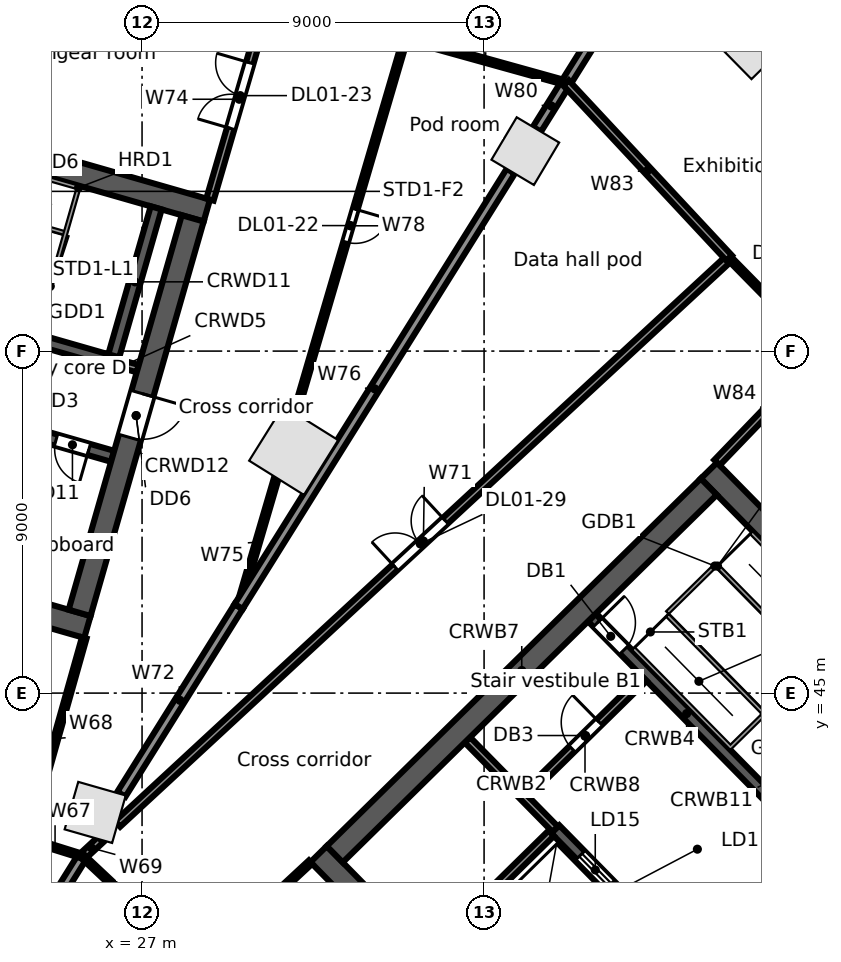
"""IFC4 building model, lengths in metres.
Left out: names, types, materials, properties, quantities, classifications, styles, units other than length and angle.
Written with IfcOpenShell. Run it as: python <this file> out.ifc"""

import sys

from ifc_helpers import new_model, si_unit, direction, frame, frame_2d, origin, origin_2d, place, context, subcontext, project, spatial, rectangle, extrude, element, fill, save


model = new_model("IFC4")
c1 = context("Model", 3, precision=1e-05, world=origin(), true_north=direction((0.0, 1.0)))
c2 = subcontext(c1, "Body", "Model", "MODEL_VIEW")
j1 = project(units=[si_unit("LENGTHUNIT", "METRE"), si_unit("PLANEANGLEUNIT", "RADIAN")], contexts=[c1])
p1 = place(None, origin())
s1 = spatial("IfcSite", under=j1, at=p1, CompositionType="ELEMENT")
p2 = place(p1, origin())
s2 = spatial("IfcBuilding", under=s1, at=p2, CompositionType="ELEMENT")
p3 = place(p2, frame((0.0, 0.0, 6.5)))
s3 = spatial("IfcBuildingStorey", under=s2, at=p3, CompositionType="ELEMENT", Elevation=6.5)
for number, where, z_axis, x_axis in (
    (1, (37.085, 59.262, 0.0), (0.0, 0.0, 1.0), (-0.859, 0.511, 0.0)),
    (2, (25.767, 41.86, 0.0), (0.0, 0.0, 1.0), (0.961, -0.276, 0.0)),
):
    element("IfcColumn", number, at=place(p3, frame(where, z_axis=z_axis, x_axis=x_axis)), inside=s3, PredefinedType="COLUMN", context=c2, shape_type="SweptSolid", body=[
        extrude(rectangle(XDim=1.3, YDim=1.3, at=origin_2d()), origin(), (0.0, 0.0, 1.0), 5.0),
    ])
p4 = place(p3, frame((30.99, 51.386, 0.0), z_axis=(0.0, 0.0, 1.0), x_axis=(0.529919264233, 0.848048096156, 0.0)))
e3 = element("IfcColumn", 3, at=p4, inside=s3, PredefinedType="COLUMN", context=c2, shape_type="SweptSolid", body=[
    extrude(rectangle(XDim=1.7, YDim=1.7, at=origin_2d()), origin(), (0.0, 0.0, 1.0), 5.0),
])
p5 = place(p3, frame((43.042, 61.863, 0.0), z_axis=(0.0, 0.0, 1.0), x_axis=(-0.7009092643, 0.713250449154, 0.0)))
e4 = element("IfcColumn", 4, at=p5, inside=s3, PredefinedType="COLUMN", context=c2, shape_type="SweptSolid", body=[
    extrude(rectangle(XDim=1.0, YDim=1.0, at=origin_2d()), origin(), (0.0, 0.0, 1.0), 5.0),
])
p6 = place(p3, frame((31.646, 40.763, 0.0), z_axis=(0.0, 0.0, 1.0), x_axis=(0.700911255944, -0.713248491965, 0.0)))
e5 = element("IfcWall", 5, at=p6, inside=s3, PredefinedType="SOLIDWALL", context=c2, shape_type="SweptSolid", body=[
    extrude(rectangle(XDim=15.0, YDim=0.6, at=frame_2d((7.5, 0.0))), origin(), (0.0, 0.0, 1.0), 4.65),
])
p7 = place(p6, frame((12.9, 0.0, 0.0)))
e6 = element("IfcOpeningElement", 6, at=p7, cuts=e5, PredefinedType="OPENING", context=c2, shape_type="SweptSolid", body=[
    extrude(rectangle(XDim=1.2, YDim=2.1, at=frame_2d((0.6, 1.05))), frame((0.0, 0.31, 0.0), z_axis=(0.0, -1.0, 0.0), x_axis=(1.0, 0.0, 0.0)), (0.0, 0.0, 1.0), 0.62),
])
p8 = place(p3, frame((35.561, 43.769, 0.0), z_axis=(0.0, 0.0, 1.0), x_axis=(0.70090232736, -0.713257266, 0.0)))
e7 = element("IfcWall", 7, at=p8, inside=s3, PredefinedType="SOLIDWALL", context=c2, shape_type="SweptSolid", body=[
    extrude(rectangle(XDim=3.3, YDim=0.2, at=frame_2d((1.65, 0.0))), origin(), (0.0, 0.0, 1.0), 4.65),
])
p9 = place(p3, frame((37.874, 41.416, 0.0), z_axis=(0.0, 0.0, 1.0), x_axis=(0.700918271237, -0.71324159795, 0.0)))
e8 = element("IfcWall", 8, at=p9, inside=s3, PredefinedType="SOLIDWALL", context=c2, shape_type="SweptSolid", body=[
    extrude(rectangle(XDim=8.4, YDim=0.3, at=frame_2d((4.2, 0.0))), origin(), (0.0, 0.0, 1.0), 4.65),
])
p10 = place(p9, frame((0.95, 0.0, 0.0)))
e9 = element("IfcOpeningElement", 9, at=p10, cuts=e8, PredefinedType="OPENING", context=c2, shape_type="SweptSolid", body=[
    extrude(rectangle(XDim=1.1, YDim=2.1, at=frame_2d((0.55, 1.05))), frame((0.0, 0.16, 0.0), z_axis=(0.0, -1.0, 0.0), x_axis=(1.0, 0.0, 0.0)), (0.0, 0.0, 1.0), 0.32),
])
p11 = place(p9, frame((3.95, 0.0, 0.0)))
e10 = element("IfcOpeningElement", 10, at=p11, cuts=e8, PredefinedType="OPENING", context=c2, shape_type="SweptSolid", body=[
    extrude(rectangle(XDim=1.1, YDim=2.1, at=frame_2d((0.55, 1.05))), frame((0.0, 0.16, 0.0), z_axis=(0.0, -1.0, 0.0), x_axis=(1.0, 0.0, 0.0)), (0.0, 0.0, 1.0), 0.32),
])
p12 = place(p9, frame((6.65, 0.0, 0.0)))
e11 = element("IfcOpeningElement", 11, at=p12, cuts=e8, PredefinedType="OPENING", context=c2, shape_type="SweptSolid", body=[
    extrude(rectangle(XDim=1.1, YDim=2.1, at=frame_2d((0.55, 1.05))), frame((0.0, 0.16, 0.0), z_axis=(0.0, -1.0, 0.0), x_axis=(1.0, 0.0, 0.0)), (0.0, 0.0, 1.0), 0.32),
])
p13 = place(p3, frame((38.842, 46.993, 0.0), z_axis=(0.0, 0.0, 1.0), x_axis=(0.700907701701, -0.713251984713, 0.0)))
e12 = element("IfcWall", 12, at=p13, inside=s3, PredefinedType="SOLIDWALL", context=c2, shape_type="SweptSolid", body=[
    extrude(rectangle(XDim=7.1, YDim=0.3, at=frame_2d((3.55, 0.0))), origin(), (0.0, 0.0, 1.0), 4.65),
])
p14 = place(p13, frame((0.2, 0.0, 0.0)))
e13 = element("IfcOpeningElement", 13, at=p14, cuts=e12, PredefinedType="OPENING", context=c2, shape_type="SweptSolid", body=[
    extrude(rectangle(XDim=1.0, YDim=2.1, at=frame_2d((0.5, 1.05))), frame((0.0, 0.16, 0.0), z_axis=(0.0, -1.0, 0.0), x_axis=(1.0, 0.0, 0.0)), (0.0, 0.0, 1.0), 0.32),
])
p15 = place(p3, frame((41.917, 50.856, 0.0), z_axis=(0.0, 0.0, 1.0), x_axis=(0.700911255944, -0.713248491965, 0.0)))
e14 = element("IfcWall", 14, at=p15, inside=s3, PredefinedType="SOLIDWALL", context=c2, shape_type="SweptSolid", body=[
    extrude(rectangle(XDim=15.0, YDim=0.6, at=frame_2d((7.5, 0.0))), origin(), (0.0, 0.0, 1.0), 4.65),
])
p16 = place(p3, frame((32.07, 40.759, 0.0), z_axis=(0.0, 0.0, 1.0), x_axis=(0.713245344712, 0.70091445858, 0.0)))
e15 = element("IfcWall", 15, at=p16, inside=s3, PredefinedType="SOLIDWALL", context=c2, shape_type="SweptSolid", body=[
    extrude(rectangle(XDim=13.8, YDim=0.6, at=frame_2d((6.9, 0.0))), origin(), (0.0, 0.0, 1.0), 4.65),
])
p17 = place(p3, frame((37.104, 42.342, 0.0), z_axis=(0.0, 0.0, 1.0), x_axis=(0.713281298468, 0.700877870428, 0.0)))
e16 = element("IfcWall", 16, at=p17, inside=s3, PredefinedType="PARTITIONING", context=c2, shape_type="SweptSolid", body=[
    extrude(rectangle(XDim=4.35, YDim=0.2, at=frame_2d((2.175, 0.0))), origin(), (0.0, 0.0, 1.0), 4.65),
])
p18 = place(p17, frame((1.7, 0.0, 0.0)))
e17 = element("IfcOpeningElement", 17, at=p18, cuts=e16, PredefinedType="OPENING", context=c2, shape_type="SweptSolid", body=[
    extrude(rectangle(XDim=1.0, YDim=2.1, at=frame_2d((0.5, 1.05))), frame((0.0, 0.11, 0.0), z_axis=(0.0, -1.0, 0.0), x_axis=(1.0, 0.0, 0.0)), (0.0, 0.0, 1.0), 0.22),
])
p19 = place(p3, frame((34.593, 38.191, 0.0), z_axis=(0.0, 0.0, 1.0), x_axis=(0.713252216116, 0.700907466222, 0.0)))
e18 = element("IfcWall", 18, at=p19, inside=s3, PredefinedType="SOLIDWALL", context=c2, shape_type="SweptSolid", body=[
    extrude(rectangle(XDim=4.45, YDim=0.2, at=frame_2d((2.225, 0.0))), origin(), (0.0, 0.0, 1.0), 4.65),
])
p20 = place(p3, frame((42.163, 30.488, 0.0), z_axis=(0.0, 0.0, 1.0), x_axis=(0.713245344712, 0.70091445858, 0.0)))
e19 = element("IfcWall", 19, at=p20, inside=s3, PredefinedType="SOLIDWALL", context=c2, shape_type="SweptSolid", body=[
    extrude(rectangle(XDim=13.8, YDim=0.6, at=frame_2d((6.9, 0.0))), origin(), (0.0, 0.0, 1.0), 4.65),
])
p21 = place(p3, frame((16.911, 49.221, 0.0), z_axis=(0.0, 0.0, 1.0), x_axis=(0.96126248289, -0.275634611374, 0.0)))
e20 = element("IfcWall", 20, at=p21, inside=s3, PredefinedType="SOLIDWALL", context=c2, shape_type="SweptSolid", body=[
    extrude(rectangle(XDim=9.0, YDim=0.6, at=frame_2d((4.5, 0.0))), origin(), (0.0, 0.0, 1.0), 4.65),
])
p22 = place(p3, frame((21.131, 52.692, 0.0), z_axis=(0.0, 0.0, 1.0), x_axis=(0.961271492568, -0.275603188616, 0.0)))
e21 = element("IfcWall", 21, at=p22, inside=s3, PredefinedType="SOLIDWALL", context=c2, shape_type="SweptSolid", body=[
    extrude(rectangle(XDim=5.3, YDim=0.3, at=frame_2d((2.65, 0.0))), origin(), (0.0, 0.0, 1.0), 4.65),
])
p23 = place(p22, frame((0.95, 0.0, 0.0)))
e22 = element("IfcOpeningElement", 22, at=p23, cuts=e21, PredefinedType="OPENING", context=c2, shape_type="SweptSolid", body=[
    extrude(rectangle(XDim=0.9, YDim=2.1, at=frame_2d((0.45, 1.05))), frame((0.0, 0.16, 0.0), z_axis=(0.0, -1.0, 0.0), x_axis=(1.0, 0.0, 0.0)), (0.0, 0.0, 1.0), 0.32),
])
p24 = place(p22, frame((3.75, 0.0, 0.0)))
e23 = element("IfcOpeningElement", 23, at=p24, cuts=e21, PredefinedType="OPENING", context=c2, shape_type="SweptSolid", body=[
    extrude(rectangle(XDim=0.9, YDim=2.1, at=frame_2d((0.45, 1.05))), frame((0.0, 0.16, 0.0), z_axis=(0.0, -1.0, 0.0), x_axis=(1.0, 0.0, 0.0)), (0.0, 0.0, 1.0), 0.32),
])
p25 = place(p3, frame((19.389, 55.689, 0.0), z_axis=(0.0, 0.0, 1.0), x_axis=(0.961261397636, -0.275638396117, 0.0)))
e24 = element("IfcWall", 24, at=p25, inside=s3, PredefinedType="SOLIDWALL", context=c2, shape_type="SweptSolid", body=[
    extrude(rectangle(XDim=7.1, YDim=0.3, at=frame_2d((3.55, 0.0))), origin(), (0.0, 0.0, 1.0), 4.65),
])
p26 = place(p25, frame((0.2, 0.0, 0.0)))
e25 = element("IfcOpeningElement", 25, at=p26, cuts=e24, PredefinedType="OPENING", context=c2, shape_type="SweptSolid", body=[
    extrude(rectangle(XDim=1.0, YDim=2.1, at=frame_2d((0.5, 1.05))), frame((0.0, 0.16, 0.0), z_axis=(0.0, -1.0, 0.0), x_axis=(1.0, 0.0, 0.0)), (0.0, 0.0, 1.0), 0.32),
])
p27 = place(p3, frame((26.214, 53.732, 0.0), z_axis=(0.0, 0.0, 1.0), x_axis=(0.96122076476, -0.27578005982, 0.0)))
e26 = element("IfcWall", 26, at=p27, inside=s3, PredefinedType="SOLIDWALL", context=c2, shape_type="SweptSolid", body=[
    extrude(rectangle(XDim=0.7, YDim=0.2, at=frame_2d((0.35, 0.0))), origin(), (0.0, 0.0, 1.0), 4.65),
])
p28 = place(p3, frame((20.053, 60.18, 0.0), z_axis=(0.0, 0.0, 1.0), x_axis=(0.96126248289, -0.275634611374, 0.0)))
e27 = element("IfcWall", 27, at=p28, inside=s3, PredefinedType="SOLIDWALL", context=c2, shape_type="SweptSolid", body=[
    extrude(rectangle(XDim=9.0, YDim=0.6, at=frame_2d((4.5, 0.0))), origin(), (0.0, 0.0, 1.0), 4.65),
])
p29 = place(p3, frame((26.256, 53.876, 0.0), z_axis=(0.0, 0.0, 1.0), x_axis=(0.275612739511, 0.961268754209, 0.0)))
e28 = element("IfcWall", 28, at=p29, inside=s3, PredefinedType="SOLIDWALL", context=c2, shape_type="SweptSolid", body=[
    extrude(rectangle(XDim=4.05, YDim=0.3, at=frame_2d((2.025, 0.0))), origin(), (0.0, 0.0, 1.0), 4.65),
])
p30 = place(p3, frame((25.356, 47.112, 0.0), z_axis=(0.0, 0.0, 1.0), x_axis=(0.275631631629, 0.961263337304, 0.0)))
e29 = element("IfcWall", 29, at=p30, inside=s3, PredefinedType="SOLIDWALL", context=c2, shape_type="SweptSolid", body=[
    extrude(rectangle(XDim=10.8, YDim=0.6, at=frame_2d((5.4, 0.0))), origin(), (0.0, 0.0, 1.0), 4.65),
])
p31 = place(p30, frame((4.8, 0.0, 0.0)))
e30 = element("IfcOpeningElement", 30, at=p31, cuts=e29, PredefinedType="OPENING", context=c2, shape_type="SweptSolid", body=[
    extrude(rectangle(XDim=1.2, YDim=2.1, at=frame_2d((0.6, 1.05))), frame((0.0, 0.31, 0.0), z_axis=(0.0, -1.0, 0.0), x_axis=(1.0, 0.0, 0.0)), (0.0, 0.0, 1.0), 0.62),
])
p32 = place(p3, frame((23.397, 37.442, 0.0), z_axis=(0.0, 0.0, 1.0), x_axis=(0.529805058875, 0.848119448893, 0.0)))
e31 = element("IfcWall", 31, at=p32, inside=s3, PredefinedType="PARTITIONING", context=c2, shape_type="SweptSolid", body=[
    extrude(rectangle(XDim=3.849, YDim=0.25, at=frame_2d((1.924, 0.0))), origin(), (0.0, 0.0, 1.0), 3.712),
])
p33 = place(p32, frame((0.95, 0.0, 0.0)))
e32 = element("IfcOpeningElement", 32, at=p33, cuts=e31, PredefinedType="OPENING", context=c2, shape_type="SweptSolid", body=[
    extrude(rectangle(XDim=1.8, YDim=2.1, at=frame_2d((0.9, 1.05))), frame((0.0, 0.135, 0.0), z_axis=(0.0, -1.0, 0.0), x_axis=(1.0, 0.0, 0.0)), (0.0, 0.0, 1.0), 0.27),
])
p34 = place(p3, frame((23.986, 41.159, 0.0), z_axis=(0.0, 0.0, 1.0), x_axis=(0.954522865266, -0.298137719325, 0.0)))
e33 = element("IfcWall", 33, at=p34, inside=s3, PredefinedType="PARTITIONING", context=c2, shape_type="SweptSolid", body=[
    extrude(rectangle(XDim=1.519, YDim=0.125, at=frame_2d((0.76, 0.0))), origin(), (0.0, 0.0, 1.0), 3.712),
])
p35 = place(p3, frame((23.986, 41.159, 0.0), z_axis=(0.0, 0.0, 1.0), x_axis=(0.271465437068, 0.962448188983, 0.0)))
e34 = element("IfcWall", 34, at=p35, inside=s3, PredefinedType="PARTITIONING", context=c2, shape_type="SweptSolid", body=[
    extrude(rectangle(XDim=5.5, YDim=0.125, at=frame_2d((2.75, 0.0))), origin(), (0.0, 0.0, 1.0), 3.93),
])
p36 = place(p3, frame((25.436, 40.706, 0.0), z_axis=(0.0, 0.0, 1.0), x_axis=(0.733725630695, 0.679445876329, 0.0)))
e35 = element("IfcWall", 35, at=p36, inside=s3, PredefinedType="PARTITIONING", context=c2, shape_type="SweptSolid", body=[
    extrude(rectangle(XDim=0.643, YDim=0.2, at=frame_2d((0.322, 0.0))), origin(), (0.0, 0.0, 1.0), 4.65),
])
p37 = place(p3, frame((25.436, 40.706, 0.0), z_axis=(0.0, 0.0, 1.0), x_axis=(0.729011488135, -0.684501461041, 0.0)))
e36 = element("IfcWall", 36, at=p37, inside=s3, PredefinedType="PARTITIONING", context=c2, shape_type="SweptSolid", body=[
    extrude(rectangle(XDim=4.202, YDim=0.125, at=frame_2d((2.101, 0.0))), origin(), (0.0, 0.0, 1.0), 4.65),
])
p38 = place(p37, frame((1.7, 0.0, 0.0)))
e37 = element("IfcOpeningElement", 37, at=p38, cuts=e36, PredefinedType="OPENING", context=c2, shape_type="SweptSolid", body=[
    extrude(rectangle(XDim=0.9, YDim=2.1, at=frame_2d((0.45, 1.05))), frame((0.0, 0.073, 0.0), z_axis=(0.0, -1.0, 0.0), x_axis=(1.0, 0.0, 0.0)), (0.0, 0.0, 1.0), 0.145),
])
p39 = place(p3, frame((26.356, 41.557, 0.0), z_axis=(0.0, 0.0, 1.0), x_axis=(0.734047402287, 0.679098233834, 0.0)))
e38 = element("IfcWall", 38, at=p39, inside=s3, PredefinedType="PARTITIONING", context=c2, shape_type="SweptSolid", body=[
    extrude(rectangle(XDim=21.926, YDim=0.2, at=frame_2d((10.963, 0.0))), origin(), (0.0, 0.0, 1.0), 3.73),
])
p40 = place(p39, frame((9.95, 0.0, 0.0)))
e39 = element("IfcOpeningElement", 39, at=p40, cuts=e38, PredefinedType="OPENING", context=c2, shape_type="SweptSolid", body=[
    extrude(rectangle(XDim=1.8, YDim=2.1, at=frame_2d((0.9, 1.05))), frame((0.0, 0.11, 0.0), z_axis=(0.0, -1.0, 0.0), x_axis=(1.0, 0.0, 0.0)), (0.0, 0.0, 1.0), 0.22),
])
p41 = place(p3, frame((26.456, 42.338, 0.0), z_axis=(0.0, 0.0, 1.0), x_axis=(0.529836963461, 0.848099517834, 0.0)))
e40 = element("IfcWall", 40, at=p41, inside=s3, PredefinedType="PARTITIONING", context=c2, shape_type="SweptSolid", body=[
    extrude(rectangle(XDim=5.826, YDim=0.25, at=frame_2d((2.913, 0.0))), origin(), (0.0, 0.0, 1.0), 3.712),
])
p42 = place(p3, frame((28.499, 37.83, 0.0), z_axis=(0.0, 0.0, 1.0), x_axis=(0.732973836409, 0.680256830278, 0.0)))
e41 = element("IfcWall", 41, at=p42, inside=s3, PredefinedType="PARTITIONING", context=c2, shape_type="SweptSolid", body=[
    extrude(rectangle(XDim=4.001, YDim=0.125, at=frame_2d((2.0, 0.0))), origin(), (0.0, 0.0, 1.0), 3.93),
])
p43 = place(p3, frame((28.787, 57.987, 0.0), z_axis=(0.0, 0.0, 1.0), x_axis=(0.279752860161, 0.960072047938, 0.0)))
e42 = element("IfcWall", 42, at=p43, inside=s3, PredefinedType="PARTITIONING", context=c2, shape_type="SweptSolid", body=[
    extrude(rectangle(XDim=5.501, YDim=0.2, at=frame_2d((2.75, 0.0))), origin(), (0.0, 0.0, 1.0), 3.922),
])
p44 = place(p43, frame((1.95, 0.0, 0.0)))
e43 = element("IfcOpeningElement", 43, at=p44, cuts=e42, PredefinedType="OPENING", context=c2, shape_type="SweptSolid", body=[
    extrude(rectangle(XDim=1.8, YDim=2.1, at=frame_2d((0.9, 1.05))), frame((0.0, 0.11, 0.0), z_axis=(0.0, -1.0, 0.0), x_axis=(1.0, 0.0, 0.0)), (0.0, 0.0, 1.0), 0.22),
])
p45 = place(p3, frame((29.543, 47.279, 0.0), z_axis=(0.0, 0.0, 1.0), x_axis=(0.28156355079, 0.959542582102, 0.0)))
e44 = element("IfcWall", 44, at=p45, inside=s3, PredefinedType="PARTITIONING", context=c2, shape_type="SweptSolid", body=[
    extrude(rectangle(XDim=3.531, YDim=0.125, at=frame_2d((1.765, 0.0))), origin(), (0.0, 0.0, 1.0), 3.712),
])
p46 = place(p3, frame((29.543, 47.279, 0.0), z_axis=(0.0, 0.0, 1.0), x_axis=(0.529929076845, 0.848041964477, 0.0)))
e45 = element("IfcWall", 45, at=p46, inside=s3, PredefinedType="PARTITIONING", context=c2, shape_type="SweptSolid", body=[
    extrude(rectangle(XDim=13.507, YDim=0.25, at=frame_2d((6.754, 0.0))), origin(), (0.0, 0.0, 1.0), 3.73),
])
p47 = place(p3, frame((31.034, 52.361, 0.0), z_axis=(0.0, 0.0, 1.0), x_axis=(0.281471237406, 0.959569665273, 0.0)))
e46 = element("IfcWall", 46, at=p47, inside=s3, PredefinedType="PARTITIONING", context=c2, shape_type="SweptSolid", body=[
    extrude(rectangle(XDim=10.289, YDim=0.125, at=frame_2d((5.145, 0.0))), origin(), (0.0, 0.0, 1.0), 3.922),
])
p48 = place(p47, frame((4.7, 0.0, 0.0)))
e47 = element("IfcOpeningElement", 47, at=p48, cuts=e46, PredefinedType="OPENING", context=c2, shape_type="SweptSolid", body=[
    extrude(rectangle(XDim=0.9, YDim=2.1, at=frame_2d((0.45, 1.05))), frame((0.0, 0.073, 0.0), z_axis=(0.0, -1.0, 0.0), x_axis=(1.0, 0.0, 0.0)), (0.0, 0.0, 1.0), 0.145),
])
p49 = place(p3, frame((33.93, 62.234, 0.0), z_axis=(0.0, 0.0, 1.0), x_axis=(0.963433299433, -0.267948274007, 0.0)))
e48 = element("IfcWall", 48, at=p49, inside=s3, PredefinedType="PARTITIONING", context=c2, shape_type="SweptSolid", body=[
    extrude(rectangle(XDim=4.385, YDim=0.125, at=frame_2d((2.192, 0.0))), origin(), (0.0, 0.0, 1.0), 4.018),
])
p50 = place(p3, frame((37.39, 59.837, 0.0), z_axis=(0.0, 0.0, 1.0), x_axis=(0.530151180786, 0.84790313451, 0.0)))
e49 = element("IfcWall", 49, at=p50, inside=s3, PredefinedType="PARTITIONING", context=c2, shape_type="SweptSolid", body=[
    extrude(rectangle(XDim=1.441, YDim=0.25, at=frame_2d((0.721, 0.0))), origin(), (0.0, 0.0, 1.0), 4.65),
])
p51 = place(p3, frame((38.154, 61.059, 0.0), z_axis=(0.0, 0.0, 1.0), x_axis=(0.529921368013, 0.848046781565, 0.0)))
e50 = element("IfcWall", 50, at=p51, inside=s3, PredefinedType="PARTITIONING", context=c2, shape_type="SweptSolid", body=[
    extrude(rectangle(XDim=3.961, YDim=0.25, at=frame_2d((1.98, 0.0))), origin(), (0.0, 0.0, 1.0), 4.024),
])
p52 = place(p3, frame((38.154, 61.059, 0.0), z_axis=(0.0, 0.0, 1.0), x_axis=(0.681663875787, -0.731665470312, 0.0)))
e51 = element("IfcWall", 51, at=p52, inside=s3, PredefinedType="PARTITIONING", context=c2, shape_type="SweptSolid", body=[
    extrude(rectangle(XDim=6.303, YDim=0.2, at=frame_2d((3.152, 0.0))), origin(), (0.0, 0.0, 1.0), 4.018),
])
p53 = place(p3, frame((42.13, 51.066, 0.0), z_axis=(0.0, 0.0, 1.0), x_axis=(0.693124563472, 0.720817826855, 0.0)))
e52 = element("IfcWall", 52, at=p53, inside=s3, PredefinedType="PARTITIONING", context=c2, shape_type="SweptSolid", body=[
    extrude(rectangle(XDim=4.002, YDim=0.2, at=frame_2d((2.001, 0.0))), origin(), (0.0, 0.0, 1.0), 3.83),
])
p54 = place(p3, frame((42.451, 56.447, 0.0), z_axis=(0.0, 0.0, 1.0), x_axis=(0.700941316052, -0.713218950569, 0.0)))
e53 = element("IfcWall", 53, at=p54, inside=s3, PredefinedType="PARTITIONING", context=c2, shape_type="SweptSolid", body=[
    extrude(rectangle(XDim=3.5, YDim=0.125, at=frame_2d((1.75, 0.0))), origin(), (0.0, 0.0, 1.0), 4.65),
])
p55 = place(p54, frame((1.2, 0.0, 0.0)))
e54 = element("IfcOpeningElement", 54, at=p55, cuts=e53, PredefinedType="OPENING", context=c2, shape_type="SweptSolid", body=[
    extrude(rectangle(XDim=0.9, YDim=2.1, at=frame_2d((0.45, 1.05))), frame((0.0, 0.073, 0.0), z_axis=(0.0, -1.0, 0.0), x_axis=(1.0, 0.0, 0.0)), (0.0, 0.0, 1.0), 0.145),
])
p56 = place(p10, origin())
e55 = element("IfcDoor", 55, at=p56, inside=s3, OperationType="DOUBLE_DOOR_SLIDING", PredefinedType="DOOR", context=c2, shape_type="SweptSolid", body=[
    extrude(rectangle(XDim=1.1, YDim=2.1, at=frame_2d((0.55, 1.05))), frame((0.0, 0.025, 0.0), z_axis=(0.0, -1.0, 0.0), x_axis=(1.0, 0.0, 0.0)), (0.0, 0.0, 1.0), 0.05),
])
fill(e9, e55)
p57 = place(p14, origin())
e56 = element("IfcDoor", 56, at=p57, inside=s3, OperationType="SINGLE_SWING_LEFT", PredefinedType="DOOR", context=c2, shape_type="SweptSolid", body=[
    extrude(rectangle(XDim=1.0, YDim=2.1, at=frame_2d((0.5, 1.05))), frame((0.0, 0.025, 0.0), z_axis=(0.0, -1.0, 0.0), x_axis=(1.0, 0.0, 0.0)), (0.0, 0.0, 1.0), 0.05),
])
fill(e13, e56)
p58 = place(p18, origin())
e57 = element("IfcDoor", 57, at=p58, inside=s3, OperationType="SINGLE_SWING_RIGHT", PredefinedType="DOOR", context=c2, shape_type="SweptSolid", body=[
    extrude(rectangle(XDim=1.0, YDim=2.1, at=frame_2d((0.5, 1.05))), frame((0.0, 0.025, 0.0), z_axis=(0.0, -1.0, 0.0), x_axis=(1.0, 0.0, 0.0)), (0.0, 0.0, 1.0), 0.05),
])
fill(e17, e57)
p59 = place(p31, frame((1.2, 0.0, 0.0), z_axis=(0.0, 0.0, 1.0), x_axis=(-1.0, 0.0, 0.0)))
e58 = element("IfcDoor", 58, at=p59, inside=s3, OperationType="SINGLE_SWING_LEFT", PredefinedType="DOOR", context=c2, shape_type="SweptSolid", body=[
    extrude(rectangle(XDim=1.2, YDim=2.1, at=frame_2d((0.6, 1.05))), frame((0.0, 0.025, 0.0), z_axis=(0.0, -1.0, 0.0), x_axis=(1.0, 0.0, 0.0)), (0.0, 0.0, 1.0), 0.05),
])
fill(e30, e58)
p60 = place(p24, frame((0.9, 0.0, 0.0), z_axis=(0.0, 0.0, 1.0), x_axis=(-1.0, 0.0, 0.0)))
e59 = element("IfcDoor", 59, at=p60, inside=s3, OperationType="SINGLE_SWING_LEFT", PredefinedType="DOOR", context=c2, shape_type="SweptSolid", body=[
    extrude(rectangle(XDim=0.9, YDim=2.1, at=frame_2d((0.45, 1.05))), frame((0.0, 0.025, 0.0), z_axis=(0.0, -1.0, 0.0), x_axis=(1.0, 0.0, 0.0)), (0.0, 0.0, 1.0), 0.05),
])
fill(e23, e59)
p61 = place(p48, frame((0.9, 0.0, 0.0), z_axis=(0.0, 0.0, 1.0), x_axis=(-1.0, 0.0, 0.0)))
e60 = element("IfcDoor", 60, at=p61, inside=s3, OperationType="SINGLE_SWING_LEFT", PredefinedType="DOOR", context=c2, shape_type="SweptSolid", body=[
    extrude(rectangle(XDim=0.9, YDim=2.1, at=frame_2d((0.45, 1.05))), frame((0.0, 0.025, 0.0), z_axis=(0.0, -1.0, 0.0), x_axis=(1.0, 0.0, 0.0)), (0.0, 0.0, 1.0), 0.05),
])
fill(e47, e60)
p62 = place(p44, origin())
e61 = element("IfcDoor", 61, at=p62, inside=s3, OperationType="DOUBLE_DOOR_SINGLE_SWING", PredefinedType="DOOR", context=c2, shape_type="SweptSolid", body=[
    extrude(rectangle(XDim=1.8, YDim=2.1, at=frame_2d((0.9, 1.05))), frame((0.0, 0.025, 0.0), z_axis=(0.0, -1.0, 0.0), x_axis=(1.0, 0.0, 0.0)), (0.0, 0.0, 1.0), 0.05),
])
fill(e43, e61)
p63 = place(p55, origin())
e62 = element("IfcDoor", 62, at=p63, inside=s3, OperationType="SINGLE_SWING_LEFT", PredefinedType="DOOR", context=c2, shape_type="SweptSolid", body=[
    extrude(rectangle(XDim=0.9, YDim=2.1, at=frame_2d((0.45, 1.05))), frame((0.0, 0.025, 0.0), z_axis=(0.0, -1.0, 0.0), x_axis=(1.0, 0.0, 0.0)), (0.0, 0.0, 1.0), 0.05),
])
fill(e54, e62)
p64 = place(p40, origin())
e63 = element("IfcDoor", 63, at=p64, inside=s3, OperationType="DOUBLE_DOOR_SINGLE_SWING", PredefinedType="DOOR", context=c2, shape_type="SweptSolid", body=[
    extrude(rectangle(XDim=1.8, YDim=2.1, at=frame_2d((0.9, 1.05))), frame((0.0, 0.025, 0.0), z_axis=(0.0, -1.0, 0.0), x_axis=(1.0, 0.0, 0.0)), (0.0, 0.0, 1.0), 0.05),
])
fill(e39, e63)
save(model, sys.argv[1])
